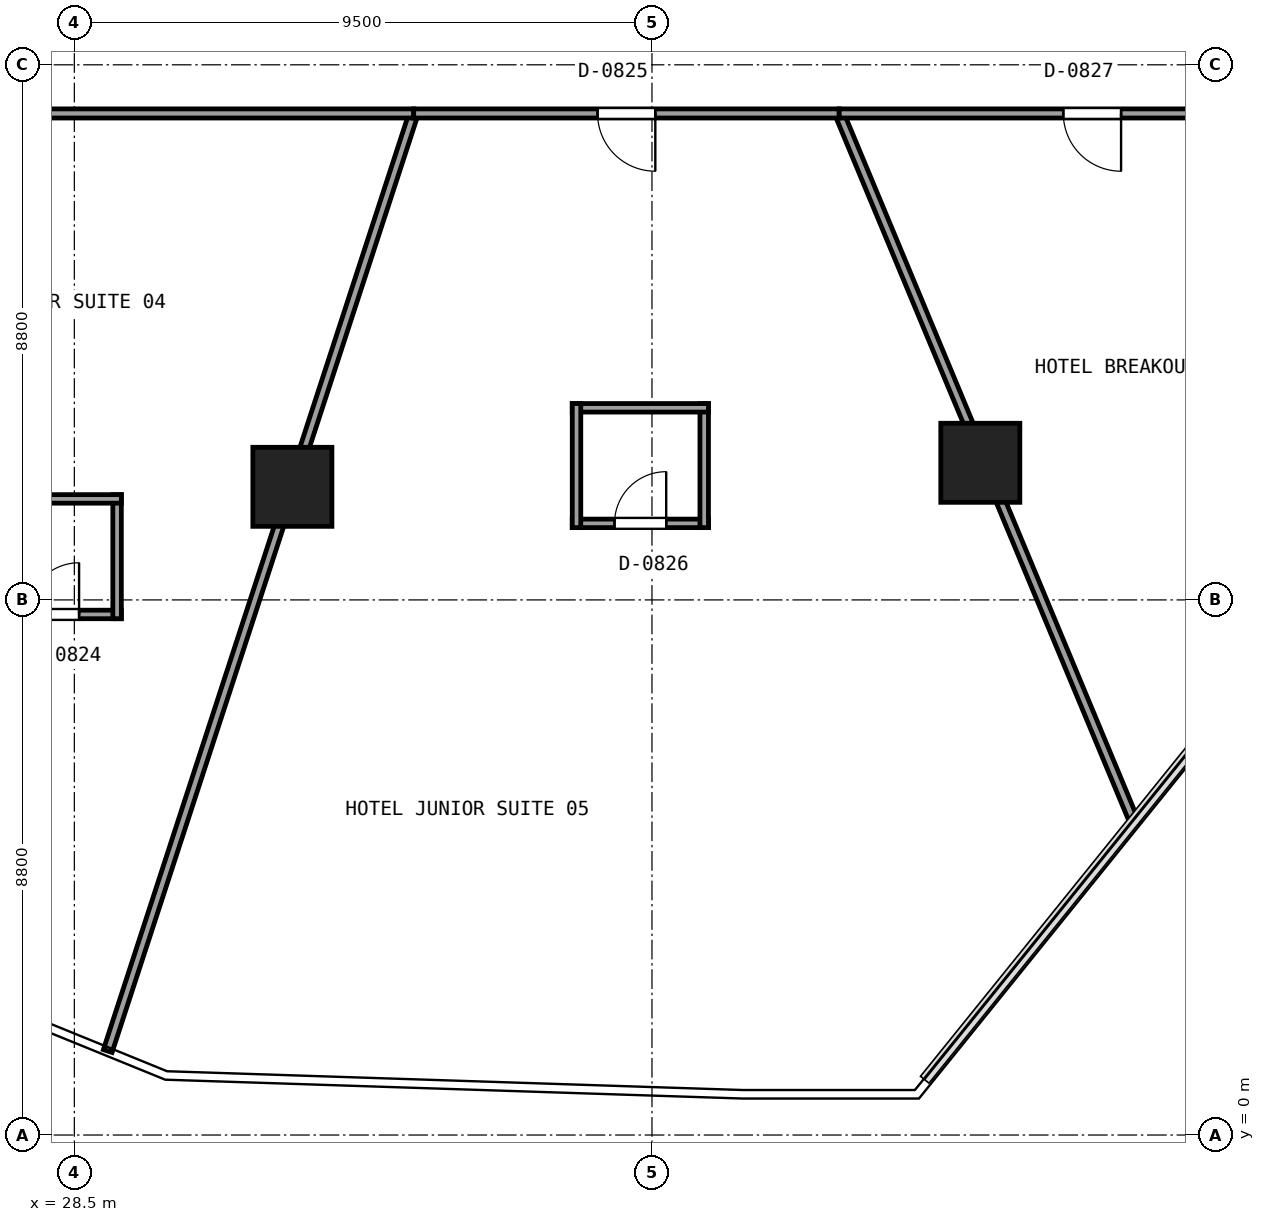
"""IFC4 building model, lengths in metres.
Left out: names, types, materials, properties, quantities, classifications, styles, units other than length and angle.
Written with IfcOpenShell. Run it as: python <this file> out.ifc"""

import sys

from ifc_helpers import new_model, si_unit, direction, frame, frame_2d, origin, origin_2d, place, context, subcontext, project, spatial, rectangle, extrude, element, fill, save


model = new_model("IFC4")
c1 = context("Model", 3, precision=1e-05, world=origin(), true_north=direction((0.0, 1.0)))
c2 = subcontext(c1, "Body", "Model", "MODEL_VIEW")
j1 = project(units=[si_unit("LENGTHUNIT", "METRE"), si_unit("PLANEANGLEUNIT", "RADIAN")], contexts=[c1])
p1 = place(None, origin())
s1 = spatial("IfcSite", under=j1, at=p1, CompositionType="ELEMENT")
p2 = place(p1, origin())
s2 = spatial("IfcBuilding", under=s1, at=p2, CompositionType="ELEMENT")
p3 = place(p2, frame((0.0, 0.0, 37.35)))
s3 = spatial("IfcBuildingStorey", under=s2, at=p3, CompositionType="ELEMENT", Elevation=37.35)
for number, where, z_axis, x_axis in (
    (1, (32.086, 10.66, 0.0), (0.0, 0.0, 1.0), (1.0, 0.0, 0.0)),
    (2, (43.4, 11.055, 0.0), (0.0, 0.0, 1.0), (1.0, 0.0, 0.0)),
):
    element("IfcColumn", number, at=place(p3, frame(where, z_axis=z_axis, x_axis=x_axis)), inside=s3, PredefinedType="COLUMN", context=c2, shape_type="SweptSolid", body=[
        extrude(rectangle(XDim=1.3, YDim=1.3, at=origin_2d()), origin(), (0.0, 0.0, 1.0), 3.17),
    ])
p4 = place(p3, frame((27.033, 8.561, 0.0), z_axis=(0.0, 0.0, 1.0), x_axis=(1.0, 0.0, 0.0)))
e3 = element("IfcWall", 3, at=p4, inside=s3, PredefinedType="PARTITIONING", context=c2, shape_type="SweptSolid", body=[
    extrude(rectangle(XDim=2.24, YDim=0.14, at=frame_2d((1.12, 0.0))), origin(), (0.0, 0.0, 1.0), 3.17),
])
p5 = place(p4, frame((0.695, 0.0, 0.0)))
e4 = element("IfcOpeningElement", 4, at=p5, cuts=e3, PredefinedType="OPENING", context=c2, shape_type="SweptSolid", body=[
    extrude(rectangle(XDim=0.85, YDim=2.1, at=frame_2d((0.425, 1.05))), frame((0.0, 0.08, 0.0), z_axis=(0.0, -1.0, 0.0), x_axis=(1.0, 0.0, 0.0)), (0.0, 0.0, 1.0), 0.16),
])
p6 = place(p3, frame((29.203, 8.491, 0.0), z_axis=(0.0, 0.0, 1.0), x_axis=(0.0, 1.0, 0.0)))
e5 = element("IfcWall", 5, at=p6, inside=s3, PredefinedType="PARTITIONING", context=c2, shape_type="SweptSolid", body=[
    extrude(rectangle(XDim=2.04, YDim=0.14, at=frame_2d((1.02, 0.0))), origin(), (0.0, 0.0, 1.0), 3.17),
])
p7 = place(p3, frame((29.273, 10.461, 0.0), z_axis=(0.0, 0.0, 1.0), x_axis=(-1.0, 0.0, 0.0)))
e6 = element("IfcWall", 6, at=p7, inside=s3, PredefinedType="PARTITIONING", context=c2, shape_type="SweptSolid", body=[
    extrude(rectangle(XDim=2.24, YDim=0.14, at=frame_2d((1.12, 0.0))), origin(), (0.0, 0.0, 1.0), 3.17),
])
p8 = place(p3, frame((36.689, 10.059, 0.0), z_axis=(0.0, 0.0, 1.0), x_axis=(1.0, 0.0, 0.0)))
e7 = element("IfcWall", 7, at=p8, inside=s3, PredefinedType="PARTITIONING", context=c2, shape_type="SweptSolid", body=[
    extrude(rectangle(XDim=2.24, YDim=0.14, at=frame_2d((1.12, 0.0))), origin(), (0.0, 0.0, 1.0), 3.17),
])
p9 = place(p8, frame((0.695, 0.0, 0.0)))
e8 = element("IfcOpeningElement", 8, at=p9, cuts=e7, PredefinedType="OPENING", context=c2, shape_type="SweptSolid", body=[
    extrude(rectangle(XDim=0.85, YDim=2.1, at=frame_2d((0.425, 1.05))), frame((0.0, 0.08, 0.0), z_axis=(0.0, -1.0, 0.0), x_axis=(1.0, 0.0, 0.0)), (0.0, 0.0, 1.0), 0.16),
])
p10 = place(p3, frame((38.859, 9.989, 0.0), z_axis=(0.0, 0.0, 1.0), x_axis=(0.0, 1.0, 0.0)))
e9 = element("IfcWall", 9, at=p10, inside=s3, PredefinedType="PARTITIONING", context=c2, shape_type="SweptSolid", body=[
    extrude(rectangle(XDim=2.04, YDim=0.14, at=frame_2d((1.02, 0.0))), origin(), (0.0, 0.0, 1.0), 2.355),
])
p11 = place(p3, frame((38.929, 11.959, 0.0), z_axis=(0.0, 0.0, 1.0), x_axis=(-1.0, 0.0, 0.0)))
e10 = element("IfcWall", 10, at=p11, inside=s3, PredefinedType="PARTITIONING", context=c2, shape_type="SweptSolid", body=[
    extrude(rectangle(XDim=2.24, YDim=0.14, at=frame_2d((1.12, 0.0))), origin(), (0.0, 0.0, 1.0), 3.17),
])
p12 = place(p3, frame((36.759, 12.029, 0.0), z_axis=(0.0, 0.0, 1.0), x_axis=(0.0, -1.0, 0.0)))
e11 = element("IfcWall", 11, at=p12, inside=s3, PredefinedType="PARTITIONING", context=c2, shape_type="SweptSolid", body=[
    extrude(rectangle(XDim=2.04, YDim=0.14, at=frame_2d((1.02, 0.0))), origin(), (0.0, 0.0, 1.0), 2.355),
])
p13 = place(p3, frame((29.049, 1.381, 0.0), z_axis=(0.0, 0.0, 1.0), x_axis=(0.310247156609, 0.950655932405, 0.0)))
e12 = element("IfcWall", 12, at=p13, inside=s3, PredefinedType="PARTITIONING", context=c2, shape_type="SweptSolid", body=[
    extrude(rectangle(XDim=16.219, YDim=0.15, at=frame_2d((8.11, 0.0))), origin(), (0.0, 0.0, 1.0), 2.395),
])
p14 = place(p3, frame((34.081, 16.8, 0.0), z_axis=(0.0, 0.0, 1.0), x_axis=(-1.0, 0.0, 0.0)))
e13 = element("IfcWall", 13, at=p14, inside=s3, PredefinedType="PARTITIONING", context=c2, shape_type="SweptSolid", body=[
    extrude(rectangle(XDim=9.081, YDim=0.15, at=frame_2d((4.541, 0.0))), origin(), (0.0, 0.0, 1.0), 2.355),
])
p15 = place(p3, frame((45.946, 5.115, 0.0), z_axis=(0.0, 0.0, 1.0), x_axis=(-0.384492125133, 0.923128271537, 0.0)))
e14 = element("IfcWall", 14, at=p15, inside=s3, PredefinedType="PARTITIONING", context=c2, shape_type="SweptSolid", body=[
    extrude(rectangle(XDim=12.658, YDim=0.15, at=frame_2d((6.329, 0.0))), origin(), (0.0, 0.0, 1.0), 2.395),
])
p16 = place(p3, frame((41.079, 16.8, 0.0), z_axis=(0.0, 0.0, 1.0), x_axis=(-1.0, 0.0, 0.0)))
e15 = element("IfcWall", 15, at=p16, inside=s3, PredefinedType="PARTITIONING", context=c2, shape_type="SweptSolid", body=[
    extrude(rectangle(XDim=6.998, YDim=0.15, at=frame_2d((3.499, 0.0))), origin(), (0.0, 0.0, 1.0), 2.395),
])
p17 = place(p16, frame((3.024, 0.0, 0.0)))
e16 = element("IfcOpeningElement", 16, at=p17, cuts=e15, PredefinedType="OPENING", context=c2, shape_type="SweptSolid", body=[
    extrude(rectangle(XDim=0.95, YDim=2.15, at=frame_2d((0.475, 1.075))), frame((0.0, 0.085, 0.0), z_axis=(0.0, -1.0, 0.0), x_axis=(1.0, 0.0, 0.0)), (0.0, 0.0, 1.0), 0.17),
])
p18 = place(p3, frame((49.4, 16.8, 0.0), z_axis=(0.0, 0.0, 1.0), x_axis=(-1.0, 0.0, 0.0)))
e17 = element("IfcWall", 17, at=p18, inside=s3, PredefinedType="PARTITIONING", context=c2, shape_type="SweptSolid", body=[
    extrude(rectangle(XDim=8.321, YDim=0.15, at=frame_2d((4.16, 0.0))), origin(), (0.0, 0.0, 1.0), 2.355),
])
p19 = place(p18, frame((3.685, 0.0, 0.0)))
e18 = element("IfcOpeningElement", 18, at=p19, cuts=e17, PredefinedType="OPENING", context=c2, shape_type="SweptSolid", body=[
    extrude(rectangle(XDim=0.95, YDim=2.15, at=frame_2d((0.475, 1.075))), frame((0.0, 0.085, 0.0), z_axis=(0.0, -1.0, 0.0), x_axis=(1.0, 0.0, 0.0)), (0.0, 0.0, 1.0), 0.17),
])
p20 = place(p5, origin())
e19 = element("IfcDoor", 19, at=p20, inside=s3, OperationType="SINGLE_SWING_RIGHT", PredefinedType="DOOR", context=c2, shape_type="SweptSolid", body=[
    extrude(rectangle(XDim=0.85, YDim=2.1, at=frame_2d((0.425, 1.05))), frame((0.0, 0.025, 0.0), z_axis=(0.0, -1.0, 0.0), x_axis=(1.0, 0.0, 0.0)), (0.0, 0.0, 1.0), 0.05),
])
fill(e4, e19)
p21 = place(p17, origin())
e20 = element("IfcDoor", 20, at=p21, inside=s3, OperationType="SINGLE_SWING_LEFT", PredefinedType="DOOR", context=c2, shape_type="SweptSolid", body=[
    extrude(rectangle(XDim=0.95, YDim=2.15, at=frame_2d((0.475, 1.075))), frame((0.0, 0.025, 0.0), z_axis=(0.0, -1.0, 0.0), x_axis=(1.0, 0.0, 0.0)), (0.0, 0.0, 1.0), 0.05),
])
fill(e16, e20)
p22 = place(p9, origin())
e21 = element("IfcDoor", 21, at=p22, inside=s3, OperationType="SINGLE_SWING_RIGHT", PredefinedType="DOOR", context=c2, shape_type="SweptSolid", body=[
    extrude(rectangle(XDim=0.85, YDim=2.1, at=frame_2d((0.425, 1.05))), frame((0.0, 0.025, 0.0), z_axis=(0.0, -1.0, 0.0), x_axis=(1.0, 0.0, 0.0)), (0.0, 0.0, 1.0), 0.05),
])
fill(e8, e21)
p23 = place(p19, origin())
e22 = element("IfcDoor", 22, at=p23, inside=s3, OperationType="SINGLE_SWING_LEFT", PredefinedType="DOOR", context=c2, shape_type="SweptSolid", body=[
    extrude(rectangle(XDim=0.95, YDim=2.15, at=frame_2d((0.475, 1.075))), frame((0.0, 0.025, 0.0), z_axis=(0.0, -1.0, 0.0), x_axis=(1.0, 0.0, 0.0)), (0.0, 0.0, 1.0), 0.05),
])
fill(e18, e22)
save(model, sys.argv[1])
